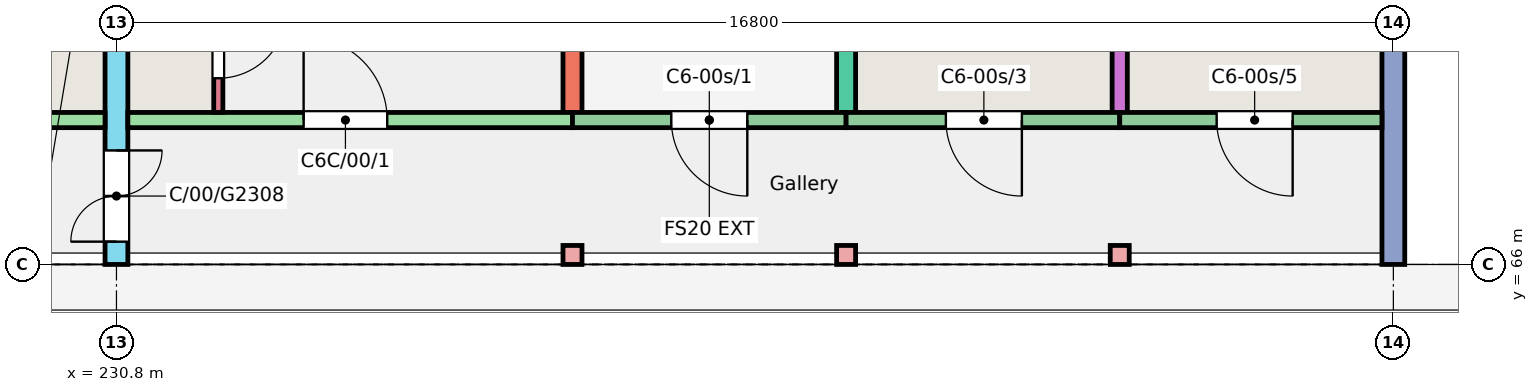
"""IFC4 building model, lengths in metres.
Left out: names, types, materials, properties, quantities, classifications, styles, units other than length and angle.
Written with IfcOpenShell. Run it as: python <this file> out.ifc"""

import sys

from ifc_helpers import new_model, si_unit, direction, frame, frame_2d, origin, origin_2d, place, context, subcontext, project, spatial, rectangle, extrude, element, fill, save


model = new_model("IFC4")
c1 = context("Model", 3, precision=1e-05, world=origin(), true_north=direction((0.0, 1.0)))
c2 = subcontext(c1, "Body", "Model", "MODEL_VIEW")
j1 = project(units=[si_unit("LENGTHUNIT", "METRE"), si_unit("PLANEANGLEUNIT", "RADIAN")], contexts=[c1])
p1 = place(None, origin())
s1 = spatial("IfcSite", under=j1, at=p1, CompositionType="ELEMENT")
p2 = place(p1, origin())
s2 = spatial("IfcBuilding", under=s1, at=p2, CompositionType="ELEMENT")
p3 = place(p2, origin())
s3 = spatial("IfcBuildingStorey", under=s2, at=p3, CompositionType="ELEMENT", Elevation=0.0)
p4 = place(p3, frame((230.8, 66.0, -0.25), z_axis=(0.0, 0.0, 1.0), x_axis=(0.0, 1.0, 0.0)))
e1 = element("IfcWall", 1, at=p4, inside=s3, PredefinedType="SHEAR", context=c2, shape_type="SweptSolid", body=[
    extrude(rectangle(XDim=11.0, YDim=0.3, at=frame_2d((5.5, 0.0))), origin(), (0.0, 0.0, 1.0), 3.25),
])
p5 = place(p4, frame((0.3, 0.0, 0.25)))
e2 = element("IfcOpeningElement", 2, at=p5, cuts=e1, PredefinedType="OPENING", context=c2, shape_type="SweptSolid", body=[
    extrude(rectangle(XDim=1.2, YDim=2.1, at=frame_2d((0.6, 1.05))), frame((0.0, 0.16, 0.0), z_axis=(0.0, -1.0, 0.0), x_axis=(1.0, 0.0, 0.0)), (0.0, 0.0, 1.0), 0.32),
])
for number, where, z_axis, x_axis in (
    (3, (236.8, 68.0, -0.25), (0.0, 0.0, 1.0), (0.0, 1.0, 0.0)),
    (4, (240.4, 68.0, -0.25), (0.0, 0.0, 1.0), (0.0, 1.0, 0.0)),
):
    element("IfcWall", number, at=place(p3, frame(where, z_axis=z_axis, x_axis=x_axis)), inside=s3, PredefinedType="SHEAR", context=c2, shape_type="SweptSolid", body=[
        extrude(rectangle(XDim=9.0, YDim=0.25, at=frame_2d((4.5, 0.0))), origin(), (0.0, 0.0, 1.0), 3.25),
    ])
p6 = place(p3, frame((244.0, 68.0, -0.25), z_axis=(0.0, 0.0, 1.0), x_axis=(0.0, 1.0, 0.0)))
e5 = element("IfcWall", 5, at=p6, inside=s3, PredefinedType="SHEAR", context=c2, shape_type="SweptSolid", body=[
    extrude(rectangle(XDim=9.0, YDim=0.2, at=frame_2d((4.5, 0.0))), origin(), (0.0, 0.0, 1.0), 3.25),
])
p7 = place(p3, frame((247.6, 66.0, -0.25), z_axis=(0.0, 0.0, 1.0), x_axis=(0.0, 1.0, 0.0)))
e6 = element("IfcWall", 6, at=p7, inside=s3, PredefinedType="SHEAR", context=c2, shape_type="SweptSolid", body=[
    extrude(rectangle(XDim=11.0, YDim=0.3, at=frame_2d((5.5, 0.0))), origin(), (0.0, 0.0, 1.0), 3.25),
])
p8 = place(p3, frame((224.8, 67.9, -0.25), z_axis=(0.0, 0.0, 1.0), x_axis=(1.0, 0.0, 0.0)))
e7 = element("IfcWall", 7, at=p8, inside=s3, PredefinedType="SHEAR", context=c2, shape_type="SweptSolid", body=[
    extrude(rectangle(XDim=5.85, YDim=0.2, at=frame_2d((2.925, 0.0))), origin(), (0.0, 0.0, 1.0), 3.25),
])
p9 = place(p8, frame((2.438, 0.0, 0.25)))
e8 = element("IfcOpeningElement", 8, at=p9, cuts=e7, PredefinedType="OPENING", context=c2, shape_type="SweptSolid", body=[
    extrude(rectangle(XDim=1.1, YDim=2.1, at=frame_2d((0.55, 1.05))), frame((0.0, 0.11, 0.0), z_axis=(0.0, -1.0, 0.0), x_axis=(1.0, 0.0, 0.0)), (0.0, 0.0, 1.0), 0.22),
])
p10 = place(p3, frame((230.95, 67.9, -0.25), z_axis=(0.0, 0.0, 1.0), x_axis=(1.0, 0.0, 0.0)))
e9 = element("IfcWall", 9, at=p10, inside=s3, PredefinedType="SHEAR", context=c2, shape_type="SweptSolid", body=[
    extrude(rectangle(XDim=5.85, YDim=0.2, at=frame_2d((2.925, 0.0))), origin(), (0.0, 0.0, 1.0), 3.25),
])
p11 = place(p10, frame((2.312, 0.0, 0.25)))
e10 = element("IfcOpeningElement", 10, at=p11, cuts=e9, PredefinedType="OPENING", context=c2, shape_type="SweptSolid", body=[
    extrude(rectangle(XDim=1.1, YDim=2.1, at=frame_2d((0.55, 1.05))), frame((0.0, 0.11, 0.0), z_axis=(0.0, -1.0, 0.0), x_axis=(1.0, 0.0, 0.0)), (0.0, 0.0, 1.0), 0.22),
])
p12 = place(p3, frame((232.14, 68.0, -0.25), z_axis=(0.0, 0.0, 1.0), x_axis=(0.0, 1.0, 0.0)))
e11 = element("IfcWall", 11, at=p12, inside=s3, PredefinedType="SHEAR", context=c2, shape_type="SweptSolid", body=[
    extrude(rectangle(XDim=1.72, YDim=0.12, at=frame_2d((0.86, 0.0))), origin(), (0.0, 0.0, 1.0), 3.25),
])
p13 = place(p12, frame((0.45, 0.0, 0.25)))
e12 = element("IfcOpeningElement", 12, at=p13, cuts=e11, PredefinedType="OPENING", context=c2, shape_type="SweptSolid", body=[
    extrude(rectangle(XDim=0.9, YDim=2.1, at=frame_2d((0.45, 1.05))), frame((0.0, 0.07, 0.0), z_axis=(0.0, -1.0, 0.0), x_axis=(1.0, 0.0, 0.0)), (0.0, 0.0, 1.0), 0.14),
])
p14 = place(p3, frame((236.8, 67.9, -0.25), z_axis=(0.0, 0.0, 1.0), x_axis=(1.0, 0.0, 0.0)))
e13 = element("IfcWall", 13, at=p14, inside=s3, PredefinedType="SOLIDWALL", context=c2, shape_type="SweptSolid", body=[
    extrude(rectangle(XDim=3.6, YDim=0.2, at=frame_2d((1.8, 0.0))), origin(), (0.0, 0.0, 1.0), 3.25),
])
p15 = place(p14, frame((1.3, 0.0, 0.25)))
e14 = element("IfcOpeningElement", 14, at=p15, cuts=e13, PredefinedType="OPENING", context=c2, shape_type="SweptSolid", body=[
    extrude(rectangle(XDim=1.0, YDim=2.1, at=frame_2d((0.5, 1.05))), frame((0.0, 0.11, 0.0), z_axis=(0.0, -1.0, 0.0), x_axis=(1.0, 0.0, 0.0)), (0.0, 0.0, 1.0), 0.22),
])
p16 = place(p3, frame((240.4, 67.9, -0.25), z_axis=(0.0, 0.0, 1.0), x_axis=(1.0, 0.0, 0.0)))
e15 = element("IfcWall", 15, at=p16, inside=s3, PredefinedType="SOLIDWALL", context=c2, shape_type="SweptSolid", body=[
    extrude(rectangle(XDim=3.6, YDim=0.2, at=frame_2d((1.8, 0.0))), origin(), (0.0, 0.0, 1.0), 3.25),
])
p17 = place(p16, frame((1.312, 0.0, 0.25)))
e16 = element("IfcOpeningElement", 16, at=p17, cuts=e15, PredefinedType="OPENING", context=c2, shape_type="SweptSolid", body=[
    extrude(rectangle(XDim=1.0, YDim=2.1, at=frame_2d((0.5, 1.05))), frame((0.0, 0.11, 0.0), z_axis=(0.0, -1.0, 0.0), x_axis=(1.0, 0.0, 0.0)), (0.0, 0.0, 1.0), 0.22),
])
p18 = place(p3, frame((244.0, 67.9, -0.25), z_axis=(0.0, 0.0, 1.0), x_axis=(1.0, 0.0, 0.0)))
e17 = element("IfcWall", 17, at=p18, inside=s3, PredefinedType="SOLIDWALL", context=c2, shape_type="SweptSolid", body=[
    extrude(rectangle(XDim=3.45, YDim=0.2, at=frame_2d((1.725, 0.0))), origin(), (0.0, 0.0, 1.0), 3.25),
])
p19 = place(p18, frame((1.275, 0.0, 0.25)))
e18 = element("IfcOpeningElement", 18, at=p19, cuts=e17, PredefinedType="OPENING", context=c2, shape_type="SweptSolid", body=[
    extrude(rectangle(XDim=1.0, YDim=2.1, at=frame_2d((0.5, 1.05))), frame((0.0, 0.11, 0.0), z_axis=(0.0, -1.0, 0.0), x_axis=(1.0, 0.0, 0.0)), (0.0, 0.0, 1.0), 0.22),
])
for number, where, z_axis, x_axis in (
    (19, (236.8, 66.125, -0.25), (0.0, 0.0, 1.0), (1.0, 0.0, 0.0)),
    (20, (240.4, 66.125, -0.25), (0.0, 0.0, 1.0), (1.0, 0.0, 0.0)),
    (21, (244.0, 66.125, -0.25), (0.0, 0.0, 1.0), (1.0, 0.0, 0.0)),
):
    element("IfcColumn", number, at=place(p3, frame(where, z_axis=z_axis, x_axis=x_axis)), inside=s3, PredefinedType="COLUMN", context=c2, shape_type="SweptSolid", body=[
        extrude(rectangle(XDim=0.25, YDim=0.25, at=origin_2d()), origin(), (0.0, 0.0, 1.0), 3.25),
    ])
p20 = place(p15, origin())
e22 = element("IfcDoor", 22, at=p20, inside=s3, OperationType="SINGLE_SWING_RIGHT", PredefinedType="DOOR", context=c2, shape_type="SweptSolid", body=[
    extrude(rectangle(XDim=1.0, YDim=2.1, at=frame_2d((0.5, 1.05))), frame((0.0, 0.025, 0.0), z_axis=(0.0, -1.0, 0.0), x_axis=(1.0, 0.0, 0.0)), (0.0, 0.0, 1.0), 0.05),
])
fill(e14, e22)
p21 = place(p17, origin())
e23 = element("IfcDoor", 23, at=p21, inside=s3, OperationType="SINGLE_SWING_RIGHT", PredefinedType="DOOR", context=c2, shape_type="SweptSolid", body=[
    extrude(rectangle(XDim=1.0, YDim=2.1, at=frame_2d((0.5, 1.05))), frame((0.0, 0.025, 0.0), z_axis=(0.0, -1.0, 0.0), x_axis=(1.0, 0.0, 0.0)), (0.0, 0.0, 1.0), 0.05),
])
fill(e16, e23)
p22 = place(p19, origin())
e24 = element("IfcDoor", 24, at=p22, inside=s3, OperationType="SINGLE_SWING_RIGHT", PredefinedType="DOOR", context=c2, shape_type="SweptSolid", body=[
    extrude(rectangle(XDim=1.0, YDim=2.1, at=frame_2d((0.5, 1.05))), frame((0.0, 0.025, 0.0), z_axis=(0.0, -1.0, 0.0), x_axis=(1.0, 0.0, 0.0)), (0.0, 0.0, 1.0), 0.05),
])
fill(e18, e24)
p23 = place(p11, origin())
e25 = element("IfcDoor", 25, at=p23, inside=s3, OperationType="SINGLE_SWING_LEFT", PredefinedType="DOOR", context=c2, shape_type="SweptSolid", body=[
    extrude(rectangle(XDim=1.1, YDim=2.1, at=frame_2d((0.55, 1.05))), frame((0.0, 0.025, 0.0), z_axis=(0.0, -1.0, 0.0), x_axis=(1.0, 0.0, 0.0)), (0.0, 0.0, 1.0), 0.05),
])
fill(e10, e25)
p24 = place(p13, origin())
e26 = element("IfcDoor", 26, at=p24, inside=s3, OperationType="SINGLE_SWING_RIGHT", PredefinedType="DOOR", context=c2, shape_type="SweptSolid", body=[
    extrude(rectangle(XDim=0.9, YDim=2.1, at=frame_2d((0.45, 1.05))), frame((0.0, 0.025, 0.0), z_axis=(0.0, -1.0, 0.0), x_axis=(1.0, 0.0, 0.0)), (0.0, 0.0, 1.0), 0.05),
])
fill(e12, e26)
p25 = place(p5, origin())
e27 = element("IfcDoor", 27, at=p25, inside=s3, OperationType="DOUBLE_DOOR_SINGLE_SWING", PredefinedType="DOOR", context=c2, shape_type="SweptSolid", body=[
    extrude(rectangle(XDim=1.2, YDim=2.1, at=frame_2d((0.6, 1.05))), frame((0.0, 0.025, 0.0), z_axis=(0.0, -1.0, 0.0), x_axis=(1.0, 0.0, 0.0)), (0.0, 0.0, 1.0), 0.05),
])
fill(e2, e27)
save(model, sys.argv[1])
